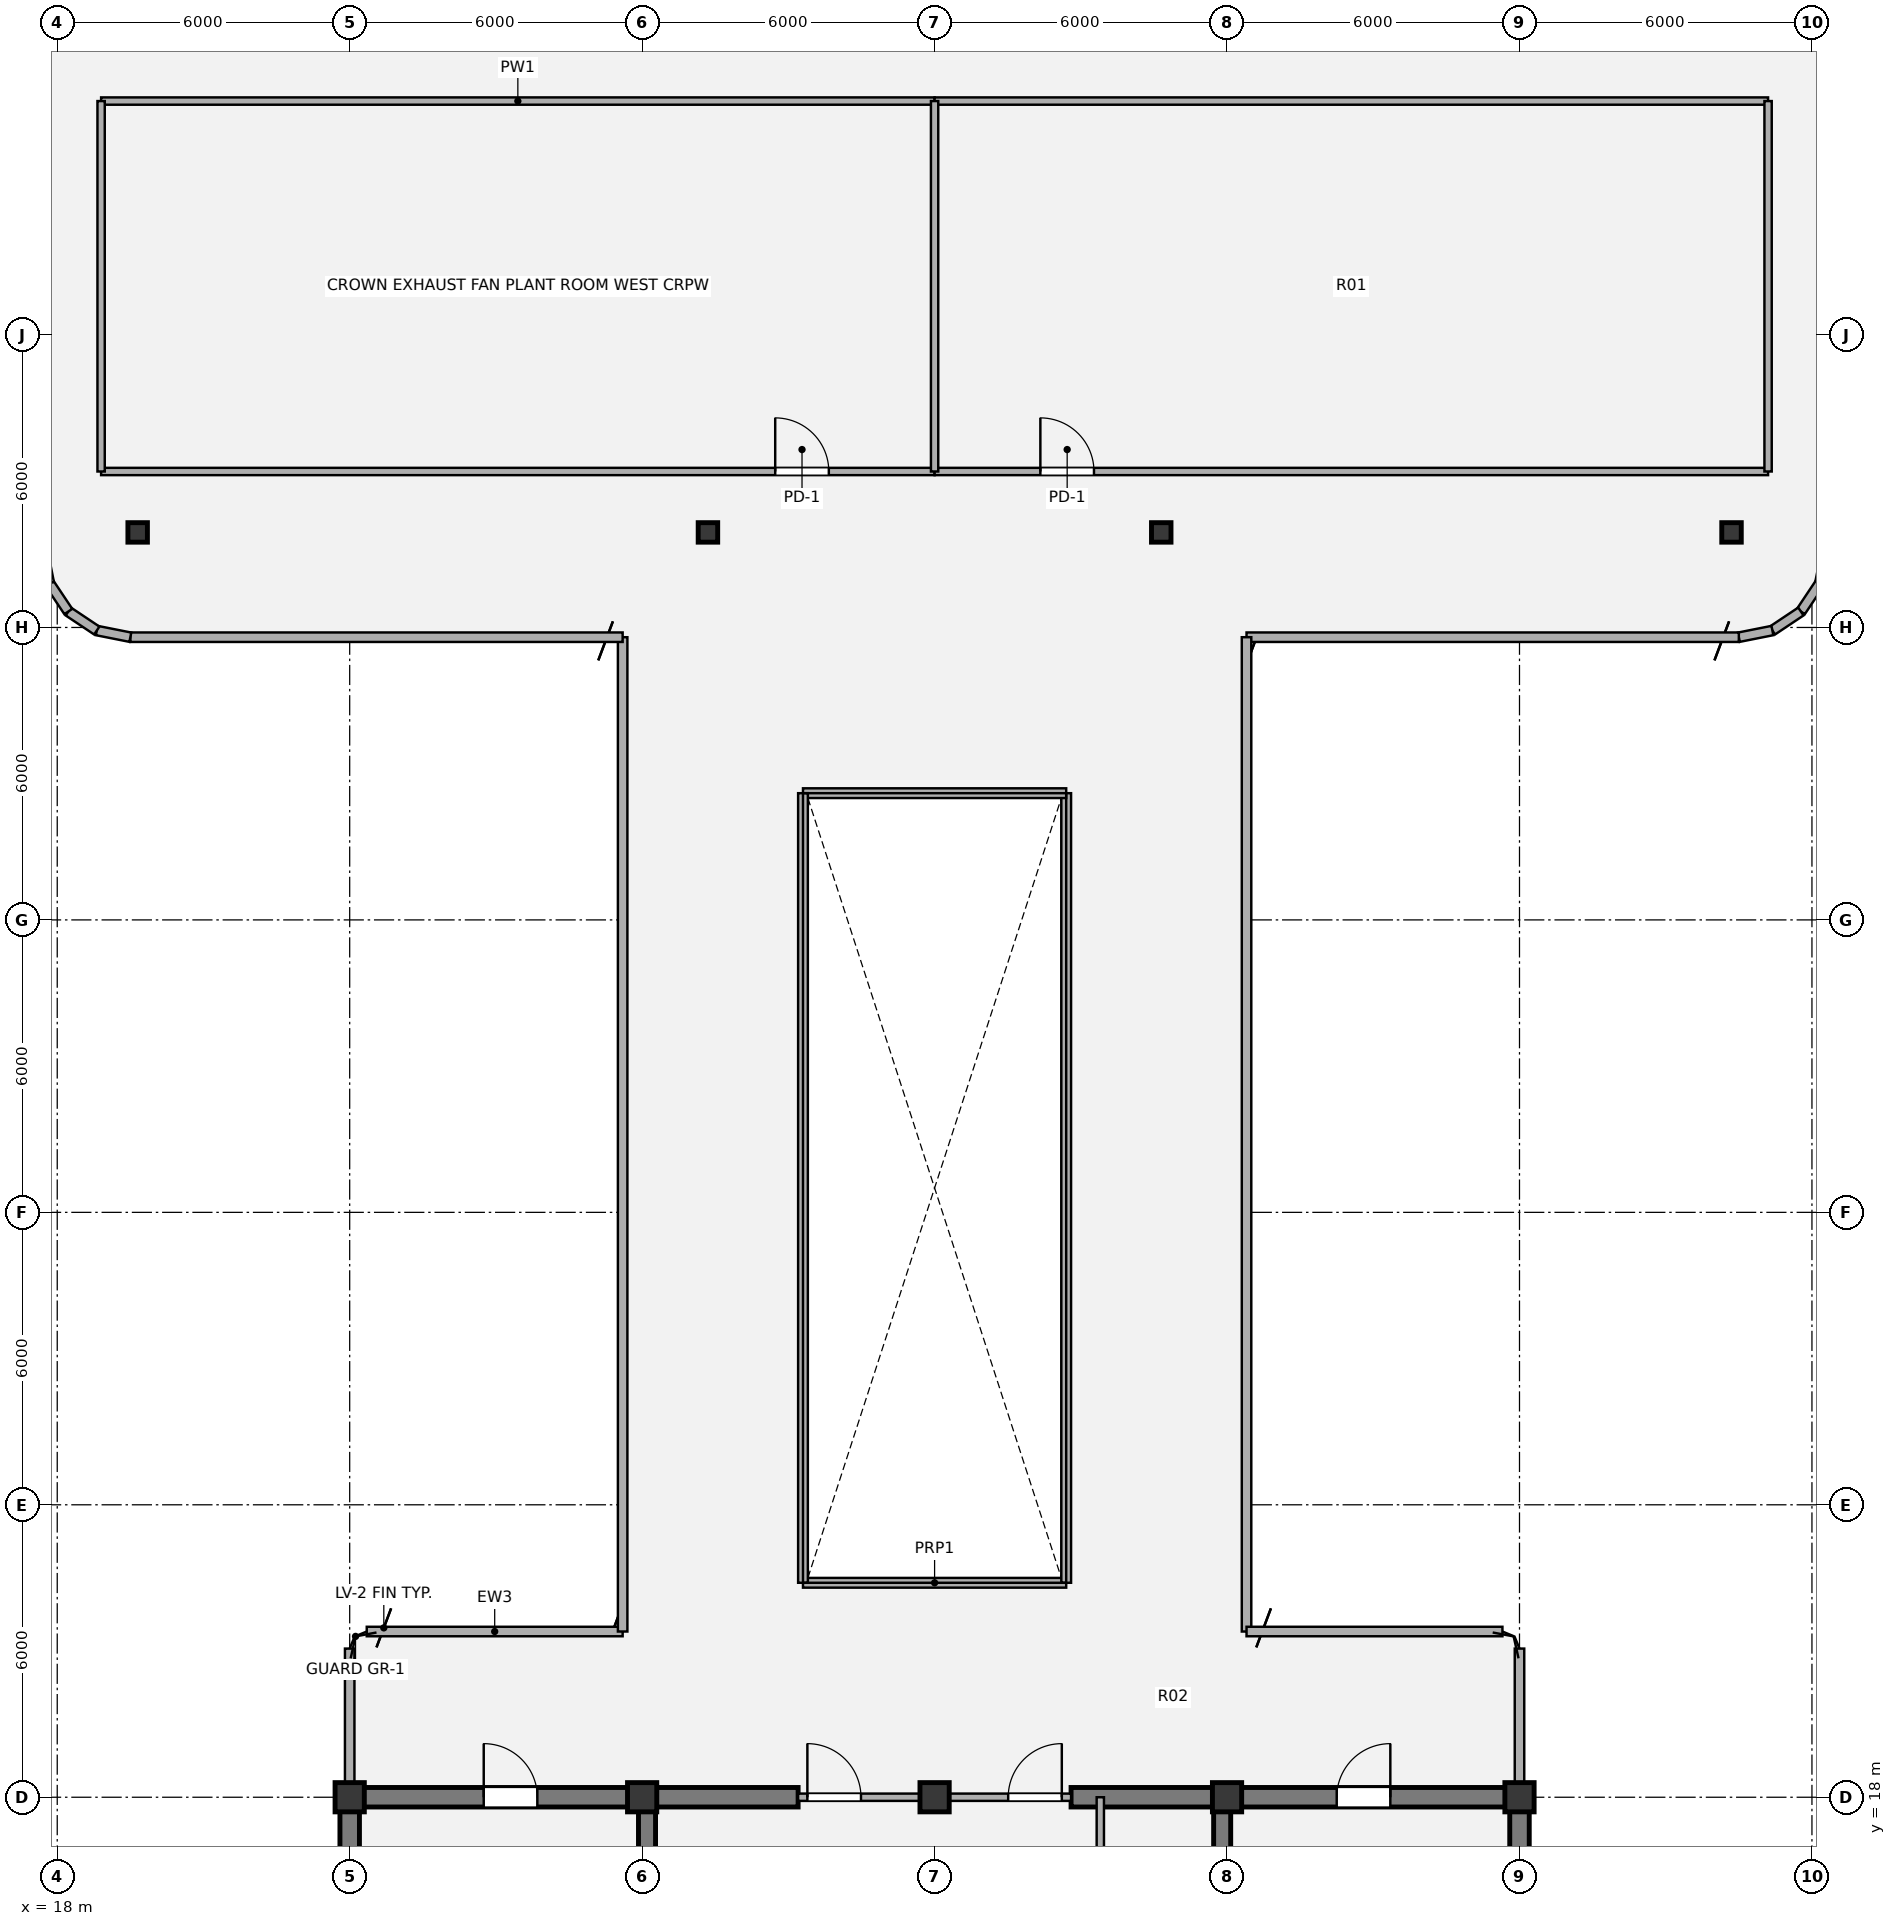
"""IFC4 building model, lengths in metres.
Left out: names, types, materials, properties, quantities, classifications, styles, units other than length and angle.
Written with IfcOpenShell. Run it as: python <this file> out.ifc"""

import sys

from ifc_helpers import new_model, si_unit, direction, frame, frame_2d, origin, origin_2d, place, context, subcontext, project, spatial, rectangle, hollow_rectangle, extrude, source, transform, mapped, element, fill, save


model = new_model("IFC4")
c1 = context("Model", 3, precision=1e-05, world=origin(), true_north=direction((0.0, 1.0)))
c2 = subcontext(c1, "Body", "Model", "MODEL_VIEW")
j1 = project(units=[si_unit("LENGTHUNIT", "METRE"), si_unit("PLANEANGLEUNIT", "RADIAN")], contexts=[c1])
p1 = place(None, origin())
s1 = spatial("IfcSite", under=j1, at=p1, CompositionType="ELEMENT")
p2 = place(p1, origin())
s2 = spatial("IfcBuilding", under=s1, at=p2, CompositionType="ELEMENT")
p3 = place(p2, frame((0.0, 0.0, 299.88)))
s3 = spatial("IfcBuildingStorey", under=s2, at=p3, CompositionType="ELEMENT", Elevation=299.88)
m1 = source(origin(), c2, "Body", "SweptSolid", [
    extrude(rectangle(XDim=0.6, YDim=0.6, at=origin_2d()), origin(), (0.0, 0.0, 1.0), 3.96),
])
for number, where, z_axis, x_axis in (
    (1, (24.0, 18.0, 0.0), (0.0, 0.0, 1.0), (1.0, 0.0, 0.0)),
    (2, (30.0, 18.0, 0.0), (0.0, 0.0, 1.0), (1.0, 0.0, 0.0)),
    (3, (36.0, 18.0, 0.0), (0.0, 0.0, 1.0), (1.0, 0.0, 0.0)),
    (4, (42.0, 18.0, 0.0), (0.0, 0.0, 1.0), (1.0, 0.0, 0.0)),
    (5, (48.0, 18.0, 0.0), (0.0, 0.0, 1.0), (1.0, 0.0, 0.0)),
):
    element("IfcColumn", number, at=place(p3, frame(where, z_axis=z_axis, x_axis=x_axis)), inside=s3, PredefinedType="COLUMN", context=c2, shape_type="MappedRepresentation", body=[
        mapped(m1, transform((0.0, 0.0, 0.0), x_axis=(1.0, 0.0, 0.0), y_axis=(0.0, 1.0, 0.0), z_axis=(0.0, 0.0, 1.0), scale=1.0)),
    ])
for number, where, z_axis, x_axis in (
    (6, (24.0, 6.0, 0.0), (0.0, 0.0, 1.0), (0.0, 1.0, 0.0)),
    (7, (48.0, 18.0, 0.0), (0.0, 0.0, 1.0), (0.0, -1.0, 0.0)),
):
    element("IfcWall", number, at=place(p3, frame(where, z_axis=z_axis, x_axis=x_axis)), inside=s3, PredefinedType="SHEAR", context=c2, shape_type="SweptSolid", body=[
        extrude(rectangle(XDim=12.0, YDim=0.4, at=frame_2d((6.0, 0.0))), origin(), (0.0, 0.0, 1.0), 3.96),
    ])
p4 = place(p3, frame((23.8, 18.0, 0.0), z_axis=(0.0, 0.0, 1.0), x_axis=(1.0, 0.0, 0.0)))
e8 = element("IfcWall", 8, at=p4, inside=s3, PredefinedType="SHEAR", context=c2, shape_type="SweptSolid", body=[
    extrude(rectangle(XDim=9.4, YDim=0.4, at=frame_2d((4.7, 0.0))), origin(), (0.0, 0.0, 1.0), 3.96),
])
p5 = place(p4, frame((2.95, 0.0, 0.0)))
e9 = element("IfcOpeningElement", 9, at=p5, cuts=e8, PredefinedType="OPENING", context=c2, shape_type="SweptSolid", body=[
    extrude(rectangle(XDim=1.1, YDim=2.1, at=origin_2d()), frame((0.55, 0.21, 1.05), z_axis=(0.0, -1.0, 0.0), x_axis=(1.0, 0.0, 0.0)), (0.0, 0.0, 1.0), 0.42),
])
p6 = place(p3, frame((38.8, 18.0, 0.0), z_axis=(0.0, 0.0, 1.0), x_axis=(1.0, 0.0, 0.0)))
e10 = element("IfcWall", 10, at=p6, inside=s3, PredefinedType="SHEAR", context=c2, shape_type="SweptSolid", body=[
    extrude(rectangle(XDim=9.4, YDim=0.4, at=frame_2d((4.7, 0.0))), origin(), (0.0, 0.0, 1.0), 3.96),
])
p7 = place(p6, frame((5.45, 0.0, 0.0)))
e11 = element("IfcOpeningElement", 11, at=p7, cuts=e10, PredefinedType="OPENING", context=c2, shape_type="SweptSolid", body=[
    extrude(rectangle(XDim=1.1, YDim=2.1, at=origin_2d()), frame((0.55, 0.21, 1.05), z_axis=(0.0, -1.0, 0.0), x_axis=(1.0, 0.0, 0.0)), (0.0, 0.0, 1.0), 0.42),
])
for number, where, z_axis, x_axis in (
    (12, (30.1, 6.0, 0.0), (0.0, 0.0, 1.0), (0.0, 1.0, 0.0)),
    (13, (41.9, 18.0, 0.0), (0.0, 0.0, 1.0), (0.0, -1.0, 0.0)),
):
    element("IfcWall", number, at=place(p3, frame(where, z_axis=z_axis, x_axis=x_axis)), inside=s3, PredefinedType="SHEAR", context=c2, shape_type="SweptSolid", body=[
        extrude(rectangle(XDim=12.0, YDim=0.35, at=frame_2d((6.0, 0.0))), origin(), (0.0, 0.0, 1.0), 3.96),
    ])
m2 = source(origin(), c2, "Body", "SweptSolid", [
    extrude(hollow_rectangle(XDim=0.4, YDim=0.4, WallThickness=0.02, OuterFilletRadius=0.04, at=origin_2d()), origin(), (0.0, 0.0, 1.0), 3.96),
])
for number, where, z_axis, x_axis in (
    (14, (19.65, 43.95, 0.0), (0.0, 0.0, 1.0), (1.0, 0.0, 0.0)),
    (15, (52.35, 43.95, 0.0), (0.0, 0.0, 1.0), (1.0, 0.0, 0.0)),
    (16, (31.35, 43.95, 0.0), (0.0, 0.0, 1.0), (1.0, 0.0, 0.0)),
    (17, (40.65, 43.95, 0.0), (0.0, 0.0, 1.0), (1.0, 0.0, 0.0)),
):
    element("IfcColumn", number, at=place(p3, frame(where, z_axis=z_axis, x_axis=x_axis)), inside=s3, PredefinedType="COLUMN", context=c2, shape_type="MappedRepresentation", body=[
        mapped(m2, transform((0.0, 0.0, 0.0), x_axis=(1.0, 0.0, 0.0), y_axis=(0.0, 1.0, 0.0), z_axis=(0.0, 0.0, 1.0), scale=1.0)),
    ])
for number, where, z_axis, x_axis in (
    (18, (48.0, 21.05, 0.0), (0.0, 0.0, 1.0), (0.0, -1.0, 0.0)),
    (19, (24.0, 18.28, 0.0), (0.0, 0.0, 1.0), (0.0, 1.0, 0.0)),
):
    element("IfcWall", number, at=place(p3, frame(where, z_axis=z_axis, x_axis=x_axis)), inside=s3, PredefinedType="SOLIDWALL", context=c2, shape_type="SweptSolid", body=[
        extrude(rectangle(XDim=2.77, YDim=0.195, at=frame_2d((1.385, 0.0))), origin(), (0.0, 0.0, 1.0), 2.898),
    ])
p8 = place(p3, frame((24.35, 21.4, 0.0), z_axis=(0.0, 0.0, 1.0), x_axis=(1.0, 0.0, 0.0)))
e20 = element("IfcWall", 20, at=p8, inside=s3, PredefinedType="SOLIDWALL", context=c2, shape_type="SweptSolid", body=[
    extrude(rectangle(XDim=5.25, YDim=0.195, at=frame_2d((2.625, 0.0))), origin(), (0.0, 0.0, 1.0), 3.71),
])
p9 = place(p3, frame((29.6, 21.4, 0.0), z_axis=(0.0, 0.0, 1.0), x_axis=(0.0, 1.0, 0.0)))
e21 = element("IfcWall", 21, at=p9, inside=s3, PredefinedType="SOLIDWALL", context=c2, shape_type="SweptSolid", body=[
    extrude(rectangle(XDim=20.4, YDim=0.195, at=frame_2d((10.2, 0.0))), origin(), (0.0, 0.0, 1.0), 2.998),
])
p10 = place(p3, frame((29.6, 41.8, 0.0), z_axis=(0.0, 0.0, 1.0), x_axis=(-1.0, 0.0, 0.0)))
e22 = element("IfcWall", 22, at=p10, inside=s3, PredefinedType="SOLIDWALL", context=c2, shape_type="SweptSolid", body=[
    extrude(rectangle(XDim=10.1, YDim=0.195, at=frame_2d((5.05, 0.0))), origin(), (0.0, 0.0, 1.0), 3.71),
])
p11 = place(p3, frame((19.5, 41.8, 0.0), z_axis=(0.0, 0.0, 1.0), x_axis=(-0.980794046625, 0.195046246068, 0.0)))
e23 = element("IfcWall", 23, at=p11, inside=s3, PredefinedType="SOLIDWALL", context=c2, shape_type="SweptSolid", body=[
    extrude(rectangle(XDim=0.702, YDim=0.195, at=frame_2d((0.351, 0.0))), origin(), (0.0, 0.0, 1.0), 3.71),
])
for number, where, z_axis, x_axis in (
    (24, (18.811, 41.937, 0.0), (0.0, 0.0, 1.0), (-0.832, 0.556, 0.0)),
    (25, (18.227, 42.327, 0.0), (0.0, 0.0, 1.0), (-0.556, 0.831, 0.0)),
    (26, (17.837, 42.911, 0.0), (0.0, 0.0, 1.0), (-0.195, 0.981, 0.0)),
    (27, (54.3, 43.6, 0.0), (0.0, 0.0, 1.0), (-0.195, -0.981, 0.0)),
    (28, (54.163, 42.911, 0.0), (0.0, 0.0, 1.0), (-0.556, -0.831, 0.0)),
    (29, (53.773, 42.327, 0.0), (0.0, 0.0, 1.0), (-0.832, -0.556, 0.0)),
):
    element("IfcWall", number, at=place(p3, frame(where, z_axis=z_axis, x_axis=x_axis)), inside=s3, PredefinedType="SOLIDWALL", context=c2, shape_type="SweptSolid", body=[
        extrude(rectangle(XDim=0.702, YDim=0.195, at=frame_2d((0.351, 0.0))), origin(), (0.0, 0.0, 1.0), 3.71),
    ])
p12 = place(p3, frame((53.189, 41.937, 0.0), z_axis=(0.0, 0.0, 1.0), x_axis=(-0.980794046625, -0.195046246068, 0.0)))
e30 = element("IfcWall", 30, at=p12, inside=s3, PredefinedType="SOLIDWALL", context=c2, shape_type="SweptSolid", body=[
    extrude(rectangle(XDim=0.702, YDim=0.195, at=frame_2d((0.351, 0.0))), origin(), (0.0, 0.0, 1.0), 3.71),
])
p13 = place(p3, frame((52.5, 41.8, 0.0), z_axis=(0.0, 0.0, 1.0), x_axis=(-1.0, 0.0, 0.0)))
e31 = element("IfcWall", 31, at=p13, inside=s3, PredefinedType="SOLIDWALL", context=c2, shape_type="SweptSolid", body=[
    extrude(rectangle(XDim=10.1, YDim=0.195, at=frame_2d((5.05, 0.0))), origin(), (0.0, 0.0, 1.0), 3.71),
])
p14 = place(p3, frame((42.4, 41.8, 0.0), z_axis=(0.0, 0.0, 1.0), x_axis=(0.0, -1.0, 0.0)))
e32 = element("IfcWall", 32, at=p14, inside=s3, PredefinedType="SOLIDWALL", context=c2, shape_type="SweptSolid", body=[
    extrude(rectangle(XDim=20.4, YDim=0.195, at=frame_2d((10.2, 0.0))), origin(), (0.0, 0.0, 1.0), 2.998),
])
p15 = place(p3, frame((42.4, 21.4, 0.0), z_axis=(0.0, 0.0, 1.0), x_axis=(1.0, 0.0, 0.0)))
e33 = element("IfcWall", 33, at=p15, inside=s3, PredefinedType="SOLIDWALL", context=c2, shape_type="SweptSolid", body=[
    extrude(rectangle(XDim=5.25, YDim=0.195, at=frame_2d((2.625, 0.0))), origin(), (0.0, 0.0, 1.0), 3.71),
])
p16 = place(p3, frame((33.3, 22.4, 0.0), z_axis=(0.0, 0.0, 1.0), x_axis=(1.0, 0.0, 0.0)))
e34 = element("IfcWall", 34, at=p16, inside=s3, PredefinedType="PARAPET", context=c2, shape_type="SweptSolid", body=[
    extrude(rectangle(XDim=5.4, YDim=0.2, at=frame_2d((2.7, 0.0))), origin(), (0.0, 0.0, 1.0), 1.22),
])
p17 = place(p3, frame((38.7, 22.4, 0.0), z_axis=(0.0, 0.0, 1.0), x_axis=(0.0, 1.0, 0.0)))
e35 = element("IfcWall", 35, at=p17, inside=s3, PredefinedType="PARAPET", context=c2, shape_type="SweptSolid", body=[
    extrude(rectangle(XDim=16.2, YDim=0.2, at=frame_2d((8.1, 0.0))), origin(), (0.0, 0.0, 1.0), 1.22),
])
p18 = place(p3, frame((38.7, 38.6, 0.0), z_axis=(0.0, 0.0, 1.0), x_axis=(-1.0, 0.0, 0.0)))
e36 = element("IfcWall", 36, at=p18, inside=s3, PredefinedType="PARAPET", context=c2, shape_type="SweptSolid", body=[
    extrude(rectangle(XDim=5.4, YDim=0.2, at=frame_2d((2.7, 0.0))), origin(), (0.0, 0.0, 1.0), 1.22),
])
p19 = place(p3, frame((33.3, 38.6, 0.0), z_axis=(0.0, 0.0, 1.0), x_axis=(0.0, -1.0, 0.0)))
e37 = element("IfcWall", 37, at=p19, inside=s3, PredefinedType="PARAPET", context=c2, shape_type="SweptSolid", body=[
    extrude(rectangle(XDim=16.2, YDim=0.2, at=frame_2d((8.1, 0.0))), origin(), (0.0, 0.0, 1.0), 1.22),
])
p20 = place(p3, frame((39.4, 11.0, 0.0), z_axis=(0.0, 0.0, 1.0), x_axis=(0.0, 1.0, 0.0)))
e38 = element("IfcWall", 38, at=p20, inside=s3, PredefinedType="PARTITIONING", context=c2, shape_type="SweptSolid", body=[
    extrude(rectangle(XDim=7.0, YDim=0.15, at=frame_2d((3.5, 0.0))), origin(), (0.0, 0.0, 1.0), 3.68),
])
p21 = place(p20, frame((2.4, 0.0, 0.0)))
e39 = element("IfcOpeningElement", 39, at=p21, cuts=e38, PredefinedType="OPENING", context=c2, shape_type="SweptSolid", body=[
    extrude(rectangle(XDim=1.1, YDim=2.1, at=origin_2d()), frame((0.55, 0.085, 1.05), z_axis=(0.0, -1.0, 0.0), x_axis=(1.0, 0.0, 0.0)), (0.0, 0.0, 1.0), 0.17),
])
p22 = place(p3, frame((33.2, 18.0, 0.0), z_axis=(0.0, 0.0, 1.0), x_axis=(1.0, 0.0, 0.0)))
e40 = element("IfcWall", 40, at=p22, inside=s3, PredefinedType="PARTITIONING", context=c2, shape_type="SweptSolid", body=[
    extrude(rectangle(XDim=5.6, YDim=0.15, at=frame_2d((2.8, 0.0))), origin(), (0.0, 0.0, 1.0), 2.695),
])
p23 = place(p22, frame((0.19, 0.0, 0.0)))
e41 = element("IfcOpeningElement", 41, at=p23, cuts=e40, PredefinedType="OPENING", context=c2, shape_type="SweptSolid", body=[
    extrude(rectangle(XDim=1.1, YDim=2.1, at=origin_2d()), frame((0.55, 0.085, 1.05), z_axis=(0.0, -1.0, 0.0), x_axis=(1.0, 0.0, 0.0)), (0.0, 0.0, 1.0), 0.17),
])
p24 = place(p22, frame((4.31, 0.0, 0.0)))
e42 = element("IfcOpeningElement", 42, at=p24, cuts=e40, PredefinedType="OPENING", context=c2, shape_type="SweptSolid", body=[
    extrude(rectangle(XDim=1.1, YDim=2.1, at=origin_2d()), frame((0.55, 0.085, 1.05), z_axis=(0.0, -1.0, 0.0), x_axis=(1.0, 0.0, 0.0)), (0.0, 0.0, 1.0), 0.17),
])
p25 = place(p3, frame((18.9, 45.2, 0.0), z_axis=(0.0, 0.0, 1.0), x_axis=(1.0, 0.0, 0.0)))
e43 = element("IfcWall", 43, at=p25, inside=s3, PredefinedType="PARTITIONING", context=c2, shape_type="SweptSolid", body=[
    extrude(rectangle(XDim=17.1, YDim=0.15, at=frame_2d((8.55, 0.0))), origin(), (0.0, 0.0, 1.0), 3.162),
])
p26 = place(p25, frame((13.83, 0.0, 0.0)))
e44 = element("IfcOpeningElement", 44, at=p26, cuts=e43, PredefinedType="OPENING", context=c2, shape_type="SweptSolid", body=[
    extrude(rectangle(XDim=1.1, YDim=2.1, at=origin_2d()), frame((0.55, 0.085, 1.05), z_axis=(0.0, -1.0, 0.0), x_axis=(1.0, 0.0, 0.0)), (0.0, 0.0, 1.0), 0.17),
])
p27 = place(p3, frame((36.0, 45.2, 0.0), z_axis=(0.0, 0.0, 1.0), x_axis=(1.0, 0.0, 0.0)))
e45 = element("IfcWall", 45, at=p27, inside=s3, PredefinedType="PARTITIONING", context=c2, shape_type="SweptSolid", body=[
    extrude(rectangle(XDim=17.1, YDim=0.15, at=frame_2d((8.55, 0.0))), origin(), (0.0, 0.0, 1.0), 3.162),
])
p28 = place(p27, frame((2.17, 0.0, 0.0)))
e46 = element("IfcOpeningElement", 46, at=p28, cuts=e45, PredefinedType="OPENING", context=c2, shape_type="SweptSolid", body=[
    extrude(rectangle(XDim=1.1, YDim=2.1, at=origin_2d()), frame((0.55, 0.085, 1.05), z_axis=(0.0, -1.0, 0.0), x_axis=(1.0, 0.0, 0.0)), (0.0, 0.0, 1.0), 0.17),
])
for number, where, z_axis, x_axis in (
    (47, (18.9, 52.8, 0.0), (0.0, 0.0, 1.0), (1.0, 0.0, 0.0)),
    (48, (36.0, 52.8, 0.0), (0.0, 0.0, 1.0), (1.0, 0.0, 0.0)),
):
    element("IfcWall", number, at=place(p3, frame(where, z_axis=z_axis, x_axis=x_axis)), inside=s3, PredefinedType="PARTITIONING", context=c2, shape_type="SweptSolid", body=[
        extrude(rectangle(XDim=17.1, YDim=0.15, at=frame_2d((8.55, 0.0))), origin(), (0.0, 0.0, 1.0), 3.162),
    ])
for number, where, z_axis, x_axis in (
    (49, (18.9, 45.2, 0.0), (0.0, 0.0, 1.0), (0.0, 1.0, 0.0)),
    (50, (36.0, 45.2, 0.0), (0.0, 0.0, 1.0), (0.0, 1.0, 0.0)),
    (51, (53.1, 45.2, 0.0), (0.0, 0.0, 1.0), (0.0, 1.0, 0.0)),
):
    element("IfcWall", number, at=place(p3, frame(where, z_axis=z_axis, x_axis=x_axis)), inside=s3, PredefinedType="PARTITIONING", context=c2, shape_type="SweptSolid", body=[
        extrude(rectangle(XDim=7.6, YDim=0.15, at=frame_2d((3.8, 0.0))), origin(), (0.0, 0.0, 1.0), 3.68),
    ])
m3 = source(origin(), c2, "Body", "SweptSolid", [
    extrude(rectangle(XDim=1.1, YDim=2.1, at=origin_2d()), frame((0.55, 0.025, 1.05), z_axis=(0.0, -1.0, 0.0), x_axis=(1.0, 0.0, 0.0)), (0.0, 0.0, 1.0), 0.05),
])
p29 = place(p23, origin())
e52 = element("IfcDoor", 52, at=p29, inside=s3, OperationType="SINGLE_SWING_LEFT", PredefinedType="DOOR", context=c2, shape_type="MappedRepresentation", body=[
    mapped(m3, transform((0.0, 0.0, 0.0), x_axis=(1.0, 0.0, 0.0), y_axis=(0.0, 1.0, 0.0), z_axis=(0.0, 0.0, 1.0), scale=1.0)),
])
fill(e41, e52)
p30 = place(p24, origin())
e53 = element("IfcDoor", 53, at=p30, inside=s3, OperationType="SINGLE_SWING_RIGHT", PredefinedType="DOOR", context=c2, shape_type="MappedRepresentation", body=[
    mapped(m3, transform((0.0, 0.0, 0.0), x_axis=(1.0, 0.0, 0.0), y_axis=(0.0, 1.0, 0.0), z_axis=(0.0, 0.0, 1.0), scale=1.0)),
])
fill(e42, e53)
p31 = place(p5, origin())
e54 = element("IfcDoor", 54, at=p31, inside=s3, OperationType="SINGLE_SWING_LEFT", PredefinedType="DOOR", context=c2, shape_type="MappedRepresentation", body=[
    mapped(m3, transform((0.0, 0.0, 0.0), x_axis=(1.0, 0.0, 0.0), y_axis=(0.0, 1.0, 0.0), z_axis=(0.0, 0.0, 1.0), scale=1.0)),
])
fill(e9, e54)
p32 = place(p7, origin())
e55 = element("IfcDoor", 55, at=p32, inside=s3, OperationType="SINGLE_SWING_RIGHT", PredefinedType="DOOR", context=c2, shape_type="MappedRepresentation", body=[
    mapped(m3, transform((0.0, 0.0, 0.0), x_axis=(1.0, 0.0, 0.0), y_axis=(0.0, 1.0, 0.0), z_axis=(0.0, 0.0, 1.0), scale=1.0)),
])
fill(e11, e55)
m4 = source(origin(), c2, "Body", "SweptSolid", [
    extrude(rectangle(XDim=1.1, YDim=2.1, at=origin_2d()), frame((0.55, 0.025, 1.05), z_axis=(0.0, -1.0, 0.0), x_axis=(1.0, 0.0, 0.0)), (0.0, 0.0, 1.0), 0.05),
])
p33 = place(p26, origin())
e56 = element("IfcDoor", 56, at=p33, inside=s3, OperationType="SINGLE_SWING_LEFT", PredefinedType="DOOR", context=c2, shape_type="MappedRepresentation", body=[
    mapped(m4, transform((0.0, 0.0, 0.0), x_axis=(1.0, 0.0, 0.0), y_axis=(0.0, 1.0, 0.0), z_axis=(0.0, 0.0, 1.0), scale=1.0)),
])
fill(e44, e56)
p34 = place(p28, origin())
e57 = element("IfcDoor", 57, at=p34, inside=s3, OperationType="SINGLE_SWING_LEFT", PredefinedType="DOOR", context=c2, shape_type="MappedRepresentation", body=[
    mapped(m4, transform((0.0, 0.0, 0.0), x_axis=(1.0, 0.0, 0.0), y_axis=(0.0, 1.0, 0.0), z_axis=(0.0, 0.0, 1.0), scale=1.0)),
])
fill(e46, e57)
save(model, sys.argv[1])
